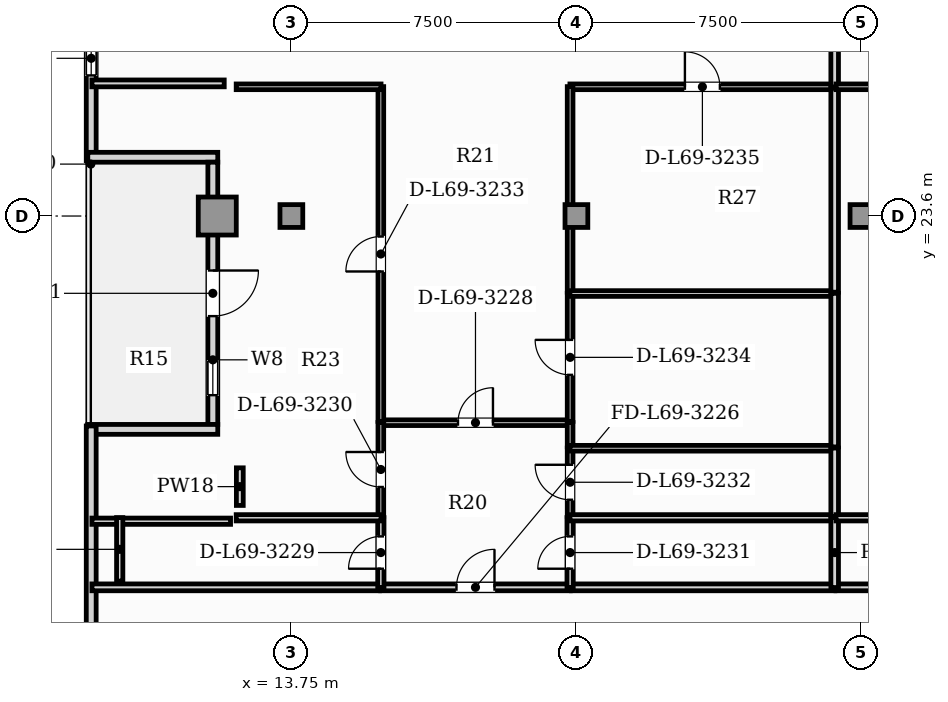
"""IFC4 building model, lengths in metres.
Left out: names, types, materials, properties, quantities, classifications, styles, units other than length and angle.
Written with IfcOpenShell. Run it as: python <this file> out.ifc"""

import sys

from ifc_helpers import new_model, si_unit, direction, frame, frame_2d, origin, origin_2d, place, context, subcontext, project, spatial, rectangle, hollow_rectangle, extrude, element, fill, save


model = new_model("IFC4")
c1 = context("Model", 3, precision=1e-05, world=origin(), true_north=direction((0.0, 1.0)))
c2 = subcontext(c1, "Body", "Model", "MODEL_VIEW")
j1 = project(units=[si_unit("LENGTHUNIT", "METRE"), si_unit("PLANEANGLEUNIT", "RADIAN")], contexts=[c1])
p1 = place(None, origin())
s1 = spatial("IfcSite", under=j1, at=p1, CompositionType="ELEMENT")
p2 = place(p1, origin())
s2 = spatial("IfcBuilding", under=s1, at=p2, CompositionType="ELEMENT")
p3 = place(p2, frame((0.0, 0.0, 281.05)))
s3 = spatial("IfcBuildingStorey", under=s2, at=p3, CompositionType="ELEMENT", Elevation=281.05)
p4 = place(p3, frame((11.8, 23.6, 0.0), z_axis=(0.0, 0.0, 1.0), x_axis=(1.0, 0.0, 0.0)))
e1 = element("IfcColumn", 1, at=p4, inside=s3, PredefinedType="USERDEFINED", context=c2, shape_type="SweptSolid", body=[
    extrude(hollow_rectangle(XDim=1.0, YDim=1.0, WallThickness=0.06, at=origin_2d()), origin(), (0.0, 0.0, 1.0), 3.85),
])
for number, where, z_axis, x_axis in (
    (2, (13.75, 23.6, 0.0), (0.0, 0.0, 1.0), (1.0, 0.0, 0.0)),
    (3, (21.25, 23.6, 0.0), (0.0, 0.0, 1.0), (1.0, 0.0, 0.0)),
    (4, (28.75, 23.6, 0.0), (0.0, 0.0, 1.0), (1.0, 0.0, 0.0)),
):
    element("IfcColumn", number, at=place(p3, frame(where, z_axis=z_axis, x_axis=x_axis)), inside=s3, PredefinedType="COLUMN", context=c2, shape_type="SweptSolid", body=[
        extrude(rectangle(XDim=0.6, YDim=0.6, at=origin_2d()), origin(), (0.0, 0.0, 1.0), 3.85),
    ])
p5 = place(p3, frame((8.483, 31.492, 0.0), z_axis=(0.0, 0.0, 1.0), x_axis=(0.0, -1.0, 0.0)))
e5 = element("IfcWall", 5, at=p5, inside=s3, PredefinedType="SOLIDWALL", context=c2, shape_type="SweptSolid", body=[
    extrude(rectangle(XDim=6.436, YDim=0.26, at=frame_2d((3.218, 0.0))), origin(), (0.0, 0.0, 1.0), 3.65),
])
p6 = place(p5, frame((3.292, 0.0, 0.95)))
e6 = element("IfcOpeningElement", 6, at=p6, cuts=e5, PredefinedType="OPENING", context=c2, shape_type="SweptSolid", body=[
    extrude(rectangle(XDim=0.9, YDim=1.5, at=frame_2d((0.45, 0.75))), frame((0.0, 0.14, 0.0), z_axis=(0.0, -1.0, 0.0), x_axis=(1.0, 0.0, 0.0)), (0.0, 0.0, 1.0), 0.28),
])
p7 = place(p3, frame((8.393, 25.146, 0.0), z_axis=(0.0, 0.0, 1.0), x_axis=(1.0, 0.0, 0.0)))
e7 = element("IfcWall", 7, at=p7, inside=s3, PredefinedType="SOLIDWALL", context=c2, shape_type="SweptSolid", body=[
    extrude(rectangle(XDim=3.42, YDim=0.26, at=frame_2d((1.71, 0.0))), origin(), (0.0, 0.0, 1.0), 3.65),
])
p8 = place(p3, frame((11.683, 25.016, 0.0), z_axis=(0.0, 0.0, 1.0), x_axis=(0.0, -1.0, 0.0)))
e8 = element("IfcWall", 8, at=p8, inside=s3, PredefinedType="SOLIDWALL", context=c2, shape_type="SweptSolid", body=[
    extrude(rectangle(XDim=6.9, YDim=0.26, at=frame_2d((3.45, 0.0))), origin(), (0.0, 0.0, 1.0), 3.19),
])
p9 = place(p8, frame((2.85, 0.0, 0.0)))
e9 = element("IfcOpeningElement", 9, at=p9, cuts=e8, PredefinedType="OPENING", context=c2, shape_type="SweptSolid", body=[
    extrude(rectangle(XDim=1.2, YDim=2.2, at=frame_2d((0.6, 1.1))), frame((0.0, 0.14, 0.0), z_axis=(0.0, -1.0, 0.0), x_axis=(1.0, 0.0, 0.0)), (0.0, 0.0, 1.0), 0.28),
])
p10 = place(p8, frame((5.23, 0.0, 0.85)))
e10 = element("IfcOpeningElement", 10, at=p10, cuts=e8, PredefinedType="OPENING", context=c2, shape_type="SweptSolid", body=[
    extrude(rectangle(XDim=0.9, YDim=1.4, at=frame_2d((0.45, 0.7))), frame((0.0, 0.14, 0.0), z_axis=(0.0, -1.0, 0.0), x_axis=(1.0, 0.0, 0.0)), (0.0, 0.0, 1.0), 0.28),
])
p11 = place(p3, frame((11.813, 17.986, 0.0), z_axis=(0.0, 0.0, 1.0), x_axis=(-1.0, 0.0, 0.0)))
e11 = element("IfcWall", 11, at=p11, inside=s3, PredefinedType="SOLIDWALL", context=c2, shape_type="SweptSolid", body=[
    extrude(rectangle(XDim=3.42, YDim=0.26, at=frame_2d((1.71, 0.0))), origin(), (0.0, 0.0, 1.0), 3.65),
])
p12 = place(p3, frame((8.483, 18.076, 0.0), z_axis=(0.0, 0.0, 1.0), x_axis=(0.0, -1.0, 0.0)))
e12 = element("IfcWall", 12, at=p12, inside=s3, PredefinedType="SOLIDWALL", context=c2, shape_type="SweptSolid", body=[
    extrude(rectangle(XDim=14.836, YDim=0.26, at=frame_2d((7.418, 0.0))), origin(), (0.0, 0.0, 1.0), 3.65),
])
p13 = place(p12, frame((8.936, 0.0, 0.85)))
e13 = element("IfcOpeningElement", 13, at=p13, cuts=e12, PredefinedType="OPENING", context=c2, shape_type="SweptSolid", body=[
    extrude(rectangle(XDim=2.1, YDim=2.05, at=frame_2d((1.05, 1.025))), frame((0.0, 0.14, 0.0), z_axis=(0.0, -1.0, 0.0), x_axis=(1.0, 0.0, 0.0)), (0.0, 0.0, 1.0), 0.28),
])
p14 = place(p3, frame((16.099, 13.83, 0.0), z_axis=(0.0, 0.0, 1.0), x_axis=(1.0, 0.0, 0.0)))
e14 = element("IfcWall", 14, at=p14, inside=s3, PredefinedType="PARTITIONING", context=c2, shape_type="SweptSolid", body=[
    extrude(rectangle(XDim=4.99, YDim=0.18, at=frame_2d((2.495, 0.0))), origin(), (0.0, 0.0, 1.0), 3.65),
])
p15 = place(p14, frame((1.995, 0.0, 0.0)))
e15 = element("IfcOpeningElement", 15, at=p15, cuts=e14, PredefinedType="OPENING", context=c2, shape_type="SweptSolid", body=[
    extrude(rectangle(XDim=1.0, YDim=2.15, at=frame_2d((0.5, 1.075))), frame((0.0, 0.1, 0.0), z_axis=(0.0, -1.0, 0.0), x_axis=(1.0, 0.0, 0.0)), (0.0, 0.0, 1.0), 0.2),
])
p16 = place(p3, frame((8.503, 13.83, 0.0), z_axis=(0.0, 0.0, 1.0), x_axis=(1.0, 0.0, 0.0)))
e16 = element("IfcWall", 16, at=p16, inside=s3, PredefinedType="PARTITIONING", context=c2, shape_type="SweptSolid", body=[
    extrude(rectangle(XDim=7.567, YDim=0.18, at=frame_2d((3.783, 0.0))), origin(), (0.0, 0.0, 1.0), 3.65),
])
p17 = place(p3, frame((21.119, 13.83, 0.0), z_axis=(0.0, 0.0, 1.0), x_axis=(1.0, 0.0, 0.0)))
e17 = element("IfcWall", 17, at=p17, inside=s3, PredefinedType="PARTITIONING", context=c2, shape_type="SweptSolid", body=[
    extrude(rectangle(XDim=6.931, YDim=0.18, at=frame_2d((3.465, 0.0))), origin(), (0.0, 0.0, 1.0), 3.65),
])
p18 = place(p3, frame((28.08, 13.83, 0.0), z_axis=(0.0, 0.0, 1.0), x_axis=(1.0, 0.0, 0.0)))
e18 = element("IfcWall", 18, at=p18, inside=s3, PredefinedType="PARTITIONING", context=c2, shape_type="SweptSolid", body=[
    extrude(rectangle(XDim=7.512, YDim=0.18, at=frame_2d((3.756, 0.0))), origin(), (0.0, 0.0, 1.0), 3.65),
])
p19 = place(p3, frame((16.099, 18.162, 0.0), z_axis=(0.0, 0.0, 1.0), x_axis=(1.0, 0.0, 0.0)))
e19 = element("IfcWall", 19, at=p19, inside=s3, PredefinedType="PARTITIONING", context=c2, shape_type="SweptSolid", body=[
    extrude(rectangle(XDim=4.99, YDim=0.15, at=frame_2d((2.495, 0.0))), origin(), (0.0, 0.0, 1.0), 3.65),
])
p20 = place(p19, frame((2.035, 0.0, 0.0)))
e20 = element("IfcOpeningElement", 20, at=p20, cuts=e19, PredefinedType="OPENING", context=c2, shape_type="SweptSolid", body=[
    extrude(rectangle(XDim=0.92, YDim=2.1, at=frame_2d((0.46, 1.05))), frame((0.0, 0.085, 0.0), z_axis=(0.0, -1.0, 0.0), x_axis=(1.0, 0.0, 0.0)), (0.0, 0.0, 1.0), 0.17),
])
p21 = place(p3, frame((16.104, 13.825, 0.0), z_axis=(0.0, 0.0, 1.0), x_axis=(0.0, 1.0, 0.0)))
e21 = element("IfcWall", 21, at=p21, inside=s3, PredefinedType="PLUMBINGWALL", context=c2, shape_type="SweptSolid", body=[
    extrude(rectangle(XDim=1.84, YDim=0.165, at=frame_2d((0.92, 0.0))), origin(), (0.0, 0.0, 1.0), 3.65),
])
p22 = place(p21, frame((0.495, 0.0, 0.0)))
e22 = element("IfcOpeningElement", 22, at=p22, cuts=e21, PredefinedType="OPENING", context=c2, shape_type="SweptSolid", body=[
    extrude(rectangle(XDim=0.85, YDim=2.1, at=frame_2d((0.425, 1.05))), frame((0.0, 0.093, 0.0), z_axis=(0.0, -1.0, 0.0), x_axis=(1.0, 0.0, 0.0)), (0.0, 0.0, 1.0), 0.185),
])
p23 = place(p3, frame((16.104, 15.695, 0.0), z_axis=(0.0, 0.0, 1.0), x_axis=(0.0, 1.0, 0.0)))
e23 = element("IfcWall", 23, at=p23, inside=s3, PredefinedType="PARTITIONING", context=c2, shape_type="SweptSolid", body=[
    extrude(rectangle(XDim=2.472, YDim=0.15, at=frame_2d((1.236, 0.0))), origin(), (0.0, 0.0, 1.0), 3.65),
])
p24 = place(p23, frame((0.776, 0.0, 0.0)))
e24 = element("IfcOpeningElement", 24, at=p24, cuts=e23, PredefinedType="OPENING", context=c2, shape_type="SweptSolid", body=[
    extrude(rectangle(XDim=0.92, YDim=2.1, at=frame_2d((0.46, 1.05))), frame((0.0, 0.085, 0.0), z_axis=(0.0, -1.0, 0.0), x_axis=(1.0, 0.0, 0.0)), (0.0, 0.0, 1.0), 0.17),
])
p25 = place(p3, frame((21.084, 13.825, 0.0), z_axis=(0.0, 0.0, 1.0), x_axis=(0.0, 1.0, 0.0)))
e25 = element("IfcWall", 25, at=p25, inside=s3, PredefinedType="PLUMBINGWALL", context=c2, shape_type="SweptSolid", body=[
    extrude(rectangle(XDim=1.84, YDim=0.165, at=frame_2d((0.92, 0.0))), origin(), (0.0, 0.0, 1.0), 3.295),
])
p26 = place(p25, frame((0.495, 0.0, 0.0)))
e26 = element("IfcOpeningElement", 26, at=p26, cuts=e25, PredefinedType="OPENING", context=c2, shape_type="SweptSolid", body=[
    extrude(rectangle(XDim=0.85, YDim=2.1, at=frame_2d((0.425, 1.05))), frame((0.0, 0.093, 0.0), z_axis=(0.0, -1.0, 0.0), x_axis=(1.0, 0.0, 0.0)), (0.0, 0.0, 1.0), 0.185),
])
p27 = place(p3, frame((21.084, 15.695, 0.0), z_axis=(0.0, 0.0, 1.0), x_axis=(0.0, 1.0, 0.0)))
e27 = element("IfcWall", 27, at=p27, inside=s3, PredefinedType="PARTITIONING", context=c2, shape_type="SweptSolid", body=[
    extrude(rectangle(XDim=1.8, YDim=0.15, at=frame_2d((0.9, 0.0))), origin(), (0.0, 0.0, 1.0), 3.295),
])
p28 = place(p27, frame((0.44, 0.0, 0.0)))
e28 = element("IfcOpeningElement", 28, at=p28, cuts=e27, PredefinedType="OPENING", context=c2, shape_type="SweptSolid", body=[
    extrude(rectangle(XDim=0.92, YDim=2.1, at=frame_2d((0.46, 1.05))), frame((0.0, 0.085, 0.0), z_axis=(0.0, -1.0, 0.0), x_axis=(1.0, 0.0, 0.0)), (0.0, 0.0, 1.0), 0.17),
])
p29 = place(p3, frame((21.084, 17.525, 0.0), z_axis=(0.0, 0.0, 1.0), x_axis=(0.0, 1.0, 0.0)))
e29 = element("IfcWall", 29, at=p29, inside=s3, PredefinedType="PARTITIONING", context=c2, shape_type="SweptSolid", body=[
    extrude(rectangle(XDim=0.642, YDim=0.15, at=frame_2d((0.321, 0.0))), origin(), (0.0, 0.0, 1.0), 3.65),
])
p30 = place(p3, frame((16.104, 18.197, 0.0), z_axis=(0.0, 0.0, 1.0), x_axis=(0.0, 1.0, 0.0)))
e30 = element("IfcWall", 30, at=p30, inside=s3, PredefinedType="PARTITIONING", context=c2, shape_type="SweptSolid", body=[
    extrude(rectangle(XDim=8.808, YDim=0.15, at=frame_2d((4.404, 0.0))), origin(), (0.0, 0.0, 1.0), 3.65),
])
p31 = place(p30, frame((3.944, 0.0, 0.0)))
e31 = element("IfcOpeningElement", 31, at=p31, cuts=e30, PredefinedType="OPENING", context=c2, shape_type="SweptSolid", body=[
    extrude(rectangle(XDim=0.92, YDim=2.1, at=frame_2d((0.46, 1.05))), frame((0.0, 0.085, 0.0), z_axis=(0.0, -1.0, 0.0), x_axis=(1.0, 0.0, 0.0)), (0.0, 0.0, 1.0), 0.17),
])
p32 = place(p3, frame((12.298, 27.0, 0.0), z_axis=(0.0, 0.0, 1.0), x_axis=(1.0, 0.0, 0.0)))
e32 = element("IfcWall", 32, at=p32, inside=s3, PredefinedType="PARTITIONING", context=c2, shape_type="SweptSolid", body=[
    extrude(rectangle(XDim=3.811, YDim=0.15, at=frame_2d((1.906, 0.0))), origin(), (0.0, 0.0, 1.0), 3.65),
])
p33 = place(p3, frame((21.084, 18.197, 0.0), z_axis=(0.0, 0.0, 1.0), x_axis=(0.0, 1.0, 0.0)))
e33 = element("IfcWall", 33, at=p33, inside=s3, PredefinedType="PARTITIONING", context=c2, shape_type="SweptSolid", body=[
    extrude(rectangle(XDim=3.369, YDim=0.15, at=frame_2d((1.685, 0.0))), origin(), (0.0, 0.0, 1.0), 3.295),
])
p34 = place(p33, frame((1.224, 0.0, 0.0)))
e34 = element("IfcOpeningElement", 34, at=p34, cuts=e33, PredefinedType="OPENING", context=c2, shape_type="SweptSolid", body=[
    extrude(rectangle(XDim=0.92, YDim=2.1, at=frame_2d((0.46, 1.05))), frame((0.0, 0.085, 0.0), z_axis=(0.0, -1.0, 0.0), x_axis=(1.0, 0.0, 0.0)), (0.0, 0.0, 1.0), 0.17),
])
p35 = place(p3, frame((21.079, 27.0, 0.0), z_axis=(0.0, 0.0, 1.0), x_axis=(1.0, 0.0, 0.0)))
e35 = element("IfcWall", 35, at=p35, inside=s3, PredefinedType="PARTITIONING", context=c2, shape_type="SweptSolid", body=[
    extrude(rectangle(XDim=6.971, YDim=0.15, at=frame_2d((3.485, 0.0))), origin(), (0.0, 0.0, 1.0), 3.65),
])
p36 = place(p35, frame((3.025, 0.0, 0.0)))
e36 = element("IfcOpeningElement", 36, at=p36, cuts=e35, PredefinedType="OPENING", context=c2, shape_type="SweptSolid", body=[
    extrude(rectangle(XDim=0.92, YDim=2.1, at=frame_2d((0.46, 1.05))), frame((0.0, 0.085, 0.0), z_axis=(0.0, -1.0, 0.0), x_axis=(1.0, 0.0, 0.0)), (0.0, 0.0, 1.0), 0.17),
])
p37 = place(p3, frame((21.084, 21.596, 0.0), z_axis=(0.0, 0.0, 1.0), x_axis=(0.0, 1.0, 0.0)))
e37 = element("IfcWall", 37, at=p37, inside=s3, PredefinedType="PARTITIONING", context=c2, shape_type="SweptSolid", body=[
    extrude(rectangle(XDim=5.409, YDim=0.15, at=frame_2d((2.705, 0.0))), origin(), (0.0, 0.0, 1.0), 3.295),
])
p38 = place(p3, frame((28.045, 26.995, 0.0), z_axis=(0.0, 0.0, 1.0), x_axis=(0.0, 1.0, 0.0)))
e38 = element("IfcWall", 38, at=p38, inside=s3, PredefinedType="PARTITIONING", context=c2, shape_type="SweptSolid", body=[
    extrude(rectangle(XDim=1.51, YDim=0.2, at=frame_2d((0.755, 0.0))), origin(), (0.0, 0.0, 1.0), 3.65),
])
p39 = place(p3, frame((12.298, 15.66, 0.0), z_axis=(0.0, 0.0, 1.0), x_axis=(1.0, 0.0, 0.0)))
e39 = element("IfcWall", 39, at=p39, inside=s3, PredefinedType="PLUMBINGWALL", context=c2, shape_type="SweptSolid", body=[
    extrude(rectangle(XDim=3.811, YDim=0.165, at=frame_2d((1.906, 0.0))), origin(), (0.0, 0.0, 1.0), 3.65),
])
p40 = place(p3, frame((21.079, 15.66, 0.0), z_axis=(0.0, 0.0, 1.0), x_axis=(1.0, 0.0, 0.0)))
e40 = element("IfcWall", 40, at=p40, inside=s3, PredefinedType="PLUMBINGWALL", context=c2, shape_type="SweptSolid", body=[
    extrude(rectangle(XDim=6.971, YDim=0.165, at=frame_2d((3.485, 0.0))), origin(), (0.0, 0.0, 1.0), 3.65),
])
p41 = place(p3, frame((28.045, 13.825, 0.0), z_axis=(0.0, 0.0, 1.0), x_axis=(0.0, 1.0, 0.0)))
e41 = element("IfcWall", 41, at=p41, inside=s3, PredefinedType="PARTITIONING", context=c2, shape_type="SweptSolid", body=[
    extrude(rectangle(XDim=1.84, YDim=0.2, at=frame_2d((0.92, 0.0))), origin(), (0.0, 0.0, 1.0), 3.65),
])
p42 = place(p3, frame((21.079, 17.49, 0.0), z_axis=(0.0, 0.0, 1.0), x_axis=(1.0, 0.0, 0.0)))
e42 = element("IfcWall", 42, at=p42, inside=s3, PredefinedType="PARTITIONING", context=c2, shape_type="SweptSolid", body=[
    extrude(rectangle(XDim=6.971, YDim=0.15, at=frame_2d((3.485, 0.0))), origin(), (0.0, 0.0, 1.0), 3.65),
])
p43 = place(p3, frame((28.045, 15.695, 0.0), z_axis=(0.0, 0.0, 1.0), x_axis=(0.0, 1.0, 0.0)))
e43 = element("IfcWall", 43, at=p43, inside=s3, PredefinedType="PARTITIONING", context=c2, shape_type="SweptSolid", body=[
    extrude(rectangle(XDim=1.8, YDim=0.2, at=frame_2d((0.9, 0.0))), origin(), (0.0, 0.0, 1.0), 3.65),
])
p44 = place(p3, frame((21.079, 21.561, 0.0), z_axis=(0.0, 0.0, 1.0), x_axis=(1.0, 0.0, 0.0)))
e44 = element("IfcWall", 44, at=p44, inside=s3, PredefinedType="PARTITIONING", context=c2, shape_type="SweptSolid", body=[
    extrude(rectangle(XDim=6.971, YDim=0.15, at=frame_2d((3.485, 0.0))), origin(), (0.0, 0.0, 1.0), 3.65),
])
p45 = place(p3, frame((28.045, 17.525, 0.0), z_axis=(0.0, 0.0, 1.0), x_axis=(0.0, 1.0, 0.0)))
e45 = element("IfcWall", 45, at=p45, inside=s3, PredefinedType="PARTITIONING", context=c2, shape_type="SweptSolid", body=[
    extrude(rectangle(XDim=4.041, YDim=0.2, at=frame_2d((2.021, 0.0))), origin(), (0.0, 0.0, 1.0), 3.65),
])
p46 = place(p3, frame((28.045, 21.596, 0.0), z_axis=(0.0, 0.0, 1.0), x_axis=(0.0, 1.0, 0.0)))
e46 = element("IfcWall", 46, at=p46, inside=s3, PredefinedType="PARTITIONING", context=c2, shape_type="SweptSolid", body=[
    extrude(rectangle(XDim=5.369, YDim=0.2, at=frame_2d((2.685, 0.0))), origin(), (0.0, 0.0, 1.0), 3.65),
])
p47 = place(p3, frame((28.08, 27.0, 0.0), z_axis=(0.0, 0.0, 1.0), x_axis=(1.0, 0.0, 0.0)))
e47 = element("IfcWall", 47, at=p47, inside=s3, PredefinedType="PARTITIONING", context=c2, shape_type="SweptSolid", body=[
    extrude(rectangle(XDim=7.552, YDim=0.15, at=frame_2d((3.776, 0.0))), origin(), (0.0, 0.0, 1.0), 3.65),
])
p48 = place(p3, frame((28.08, 15.66, 0.0), z_axis=(0.0, 0.0, 1.0), x_axis=(1.0, 0.0, 0.0)))
e48 = element("IfcWall", 48, at=p48, inside=s3, PredefinedType="PLUMBINGWALL", context=c2, shape_type="SweptSolid", body=[
    extrude(rectangle(XDim=7.552, YDim=0.165, at=frame_2d((3.776, 0.0))), origin(), (0.0, 0.0, 1.0), 3.65),
])
p49 = place(p3, frame((11.983, 27.09, 0.0), z_axis=(0.0, 0.0, 1.0), x_axis=(-1.0, 0.0, 0.0)))
e49 = element("IfcWall", 49, at=p49, inside=s3, PredefinedType="PARTITIONING", context=c2, shape_type="SweptSolid", body=[
    extrude(rectangle(XDim=3.48, YDim=0.18, at=frame_2d((1.74, 0.0))), origin(), (0.0, 0.0, 1.0), 3.65),
])
p50 = place(p3, frame((8.503, 15.57, 0.0), z_axis=(0.0, 0.0, 1.0), x_axis=(1.0, 0.0, 0.0)))
e50 = element("IfcWall", 50, at=p50, inside=s3, PredefinedType="PLUMBINGWALL", context=c2, shape_type="SweptSolid", body=[
    extrude(rectangle(XDim=3.647, YDim=0.165, at=frame_2d((1.823, 0.0))), origin(), (0.0, 0.0, 1.0), 3.65),
])
p51 = place(p3, frame((9.233, 13.995, 0.0), z_axis=(0.0, 0.0, 1.0), x_axis=(0.0, 1.0, 0.0)))
e51 = element("IfcWall", 51, at=p51, inside=s3, PredefinedType="PLUMBINGWALL", context=c2, shape_type="SweptSolid", body=[
    extrude(rectangle(XDim=1.67, YDim=0.165, at=frame_2d((0.835, 0.0))), origin(), (0.0, 0.0, 1.0), 3.65),
])
p52 = place(p3, frame((12.393, 15.985, 0.0), z_axis=(0.0, 0.0, 1.0), x_axis=(0.0, 1.0, 0.0)))
e52 = element("IfcWall", 52, at=p52, inside=s3, PredefinedType="PARTITIONING", context=c2, shape_type="SweptSolid", body=[
    extrude(rectangle(XDim=0.99, YDim=0.18, at=frame_2d((0.495, 0.0))), origin(), (0.0, 0.0, 1.0), 3.65),
])
p53 = place(p9, frame((1.2, 0.0, 0.0), z_axis=(0.0, 0.0, 1.0), x_axis=(-1.0, 0.0, 0.0)))
e53 = element("IfcDoor", 53, at=p53, inside=s3, OperationType="SINGLE_SWING_RIGHT", PredefinedType="DOOR", context=c2, shape_type="SweptSolid", body=[
    extrude(rectangle(XDim=1.2, YDim=2.2, at=frame_2d((0.6, 1.1))), frame((0.0, 0.025, 0.0), z_axis=(0.0, -1.0, 0.0), x_axis=(1.0, 0.0, 0.0)), (0.0, 0.0, 1.0), 0.05),
])
fill(e9, e53)
p54 = place(p6, origin())
e54 = element("IfcWindow", 54, at=p54, inside=s3, PartitioningType="SINGLE_PANEL", PredefinedType="WINDOW", context=c2, shape_type="SweptSolid", body=[
    extrude(rectangle(XDim=0.9, YDim=1.5, at=frame_2d((0.45, 0.75))), frame((0.0, 0.03, 0.0), z_axis=(0.0, -1.0, 0.0), x_axis=(1.0, 0.0, 0.0)), (0.0, 0.0, 1.0), 0.06),
])
fill(e6, e54)
p55 = place(p10, origin())
e55 = element("IfcWindow", 55, at=p55, inside=s3, PartitioningType="SINGLE_PANEL", PredefinedType="WINDOW", context=c2, shape_type="SweptSolid", body=[
    extrude(rectangle(XDim=0.9, YDim=1.4, at=frame_2d((0.45, 0.7))), frame((0.0, 0.03, 0.0), z_axis=(0.0, -1.0, 0.0), x_axis=(1.0, 0.0, 0.0)), (0.0, 0.0, 1.0), 0.06),
])
fill(e10, e55)
p56 = place(p15, origin())
e56 = element("IfcDoor", 56, at=p56, inside=s3, OperationType="SINGLE_SWING_RIGHT", PredefinedType="DOOR", context=c2, shape_type="SweptSolid", body=[
    extrude(rectangle(XDim=1.0, YDim=2.15, at=frame_2d((0.5, 1.075))), frame((0.0, 0.025, 0.0), z_axis=(0.0, -1.0, 0.0), x_axis=(1.0, 0.0, 0.0)), (0.0, 0.0, 1.0), 0.05),
])
fill(e15, e56)
p57 = place(p20, origin())
e57 = element("IfcDoor", 57, at=p57, inside=s3, OperationType="SINGLE_SWING_RIGHT", PredefinedType="DOOR", context=c2, shape_type="SweptSolid", body=[
    extrude(rectangle(XDim=0.92, YDim=2.1, at=frame_2d((0.46, 1.05))), frame((0.0, 0.025, 0.0), z_axis=(0.0, -1.0, 0.0), x_axis=(1.0, 0.0, 0.0)), (0.0, 0.0, 1.0), 0.05),
])
fill(e20, e57)
p58 = place(p22, origin())
e58 = element("IfcDoor", 58, at=p58, inside=s3, OperationType="SINGLE_SWING_LEFT", PredefinedType="DOOR", context=c2, shape_type="SweptSolid", body=[
    extrude(rectangle(XDim=0.85, YDim=2.1, at=frame_2d((0.425, 1.05))), frame((0.0, 0.025, 0.0), z_axis=(0.0, -1.0, 0.0), x_axis=(1.0, 0.0, 0.0)), (0.0, 0.0, 1.0), 0.05),
])
fill(e22, e58)
p59 = place(p24, origin())
e59 = element("IfcDoor", 59, at=p59, inside=s3, OperationType="SINGLE_SWING_RIGHT", PredefinedType="DOOR", context=c2, shape_type="SweptSolid", body=[
    extrude(rectangle(XDim=0.92, YDim=2.1, at=frame_2d((0.46, 1.05))), frame((0.0, 0.025, 0.0), z_axis=(0.0, -1.0, 0.0), x_axis=(1.0, 0.0, 0.0)), (0.0, 0.0, 1.0), 0.05),
])
fill(e24, e59)
p60 = place(p26, origin())
e60 = element("IfcDoor", 60, at=p60, inside=s3, OperationType="SINGLE_SWING_LEFT", PredefinedType="DOOR", context=c2, shape_type="SweptSolid", body=[
    extrude(rectangle(XDim=0.85, YDim=2.1, at=frame_2d((0.425, 1.05))), frame((0.0, 0.025, 0.0), z_axis=(0.0, -1.0, 0.0), x_axis=(1.0, 0.0, 0.0)), (0.0, 0.0, 1.0), 0.05),
])
fill(e26, e60)
p61 = place(p28, origin())
e61 = element("IfcDoor", 61, at=p61, inside=s3, OperationType="SINGLE_SWING_RIGHT", PredefinedType="DOOR", context=c2, shape_type="SweptSolid", body=[
    extrude(rectangle(XDim=0.92, YDim=2.1, at=frame_2d((0.46, 1.05))), frame((0.0, 0.025, 0.0), z_axis=(0.0, -1.0, 0.0), x_axis=(1.0, 0.0, 0.0)), (0.0, 0.0, 1.0), 0.05),
])
fill(e28, e61)
p62 = place(p31, origin())
e62 = element("IfcDoor", 62, at=p62, inside=s3, OperationType="SINGLE_SWING_LEFT", PredefinedType="DOOR", context=c2, shape_type="SweptSolid", body=[
    extrude(rectangle(XDim=0.92, YDim=2.1, at=frame_2d((0.46, 1.05))), frame((0.0, 0.025, 0.0), z_axis=(0.0, -1.0, 0.0), x_axis=(1.0, 0.0, 0.0)), (0.0, 0.0, 1.0), 0.05),
])
fill(e31, e62)
p63 = place(p34, origin())
e63 = element("IfcDoor", 63, at=p63, inside=s3, OperationType="SINGLE_SWING_RIGHT", PredefinedType="DOOR", context=c2, shape_type="SweptSolid", body=[
    extrude(rectangle(XDim=0.92, YDim=2.1, at=frame_2d((0.46, 1.05))), frame((0.0, 0.025, 0.0), z_axis=(0.0, -1.0, 0.0), x_axis=(1.0, 0.0, 0.0)), (0.0, 0.0, 1.0), 0.05),
])
fill(e34, e63)
p64 = place(p36, origin())
e64 = element("IfcDoor", 64, at=p64, inside=s3, OperationType="SINGLE_SWING_LEFT", PredefinedType="DOOR", context=c2, shape_type="SweptSolid", body=[
    extrude(rectangle(XDim=0.92, YDim=2.1, at=frame_2d((0.46, 1.05))), frame((0.0, 0.025, 0.0), z_axis=(0.0, -1.0, 0.0), x_axis=(1.0, 0.0, 0.0)), (0.0, 0.0, 1.0), 0.05),
])
fill(e36, e64)
save(model, sys.argv[1])
